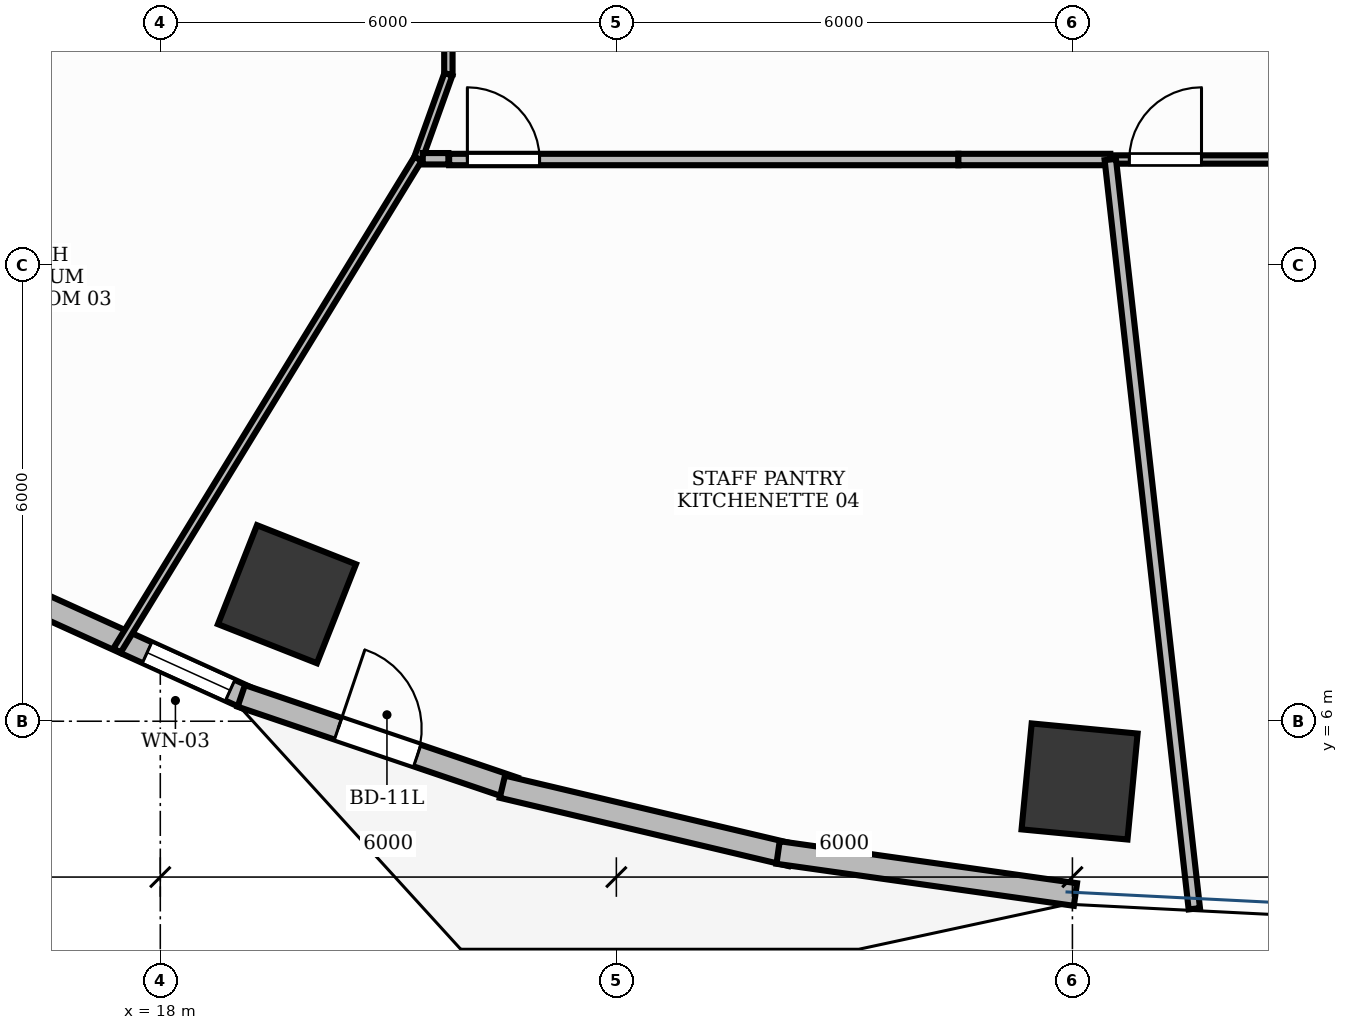
"""IFC4 building model, lengths in metres.
Left out: names, types, materials, properties, quantities, classifications, styles, units other than length and angle.
Written with IfcOpenShell. Run it as: python <this file> out.ifc"""

import sys

from ifc_helpers import new_model, si_unit, direction, frame, frame_2d, origin, origin_2d, place, context, subcontext, project, spatial, rectangle, extrude, element, fill, save


model = new_model("IFC4")
c1 = context("Model", 3, precision=1e-05, world=origin(), true_north=direction((0.0, 1.0)))
c2 = subcontext(c1, "Body", "Model", "MODEL_VIEW")
j1 = project(units=[si_unit("LENGTHUNIT", "METRE"), si_unit("PLANEANGLEUNIT", "RADIAN")], contexts=[c1])
p1 = place(None, origin())
s1 = spatial("IfcSite", under=j1, at=p1, CompositionType="ELEMENT")
p2 = place(p1, origin())
s2 = spatial("IfcBuilding", under=s1, at=p2, CompositionType="ELEMENT")
p3 = place(p2, frame((0.0, 0.0, 76.2)))
s3 = spatial("IfcBuildingStorey", under=s2, at=p3, CompositionType="ELEMENT", Elevation=76.2)
for number, where, z_axis, x_axis in (
    (1, (19.667, 7.671, -0.0), (0.0, 0.0, 1.0), (-0.93, 0.367, 0.0)),
    (2, (30.094, 5.208, -0.0), (0.0, 0.0, 1.0), (-0.995, 0.095, 0.0)),
):
    element("IfcColumn", number, at=place(p3, frame(where, z_axis=z_axis, x_axis=x_axis)), inside=s3, PredefinedType="COLUMN", context=c2, shape_type="SweptSolid", body=[
        extrude(rectangle(XDim=1.4, YDim=1.4, at=origin_2d()), origin(), (0.0, 0.0, 1.0), 3.901),
    ])
p4 = place(p3, frame((15.822, 7.812, 0.0), z_axis=(0.0, 0.0, 1.0), x_axis=(0.910608120407, -0.413270917254, 0.0)))
e3 = element("IfcWall", 3, at=p4, inside=s3, PredefinedType="STANDARD", context=c2, shape_type="SweptSolid", body=[
    extrude(rectangle(XDim=3.7, YDim=0.3, at=frame_2d((1.85, 0.0))), origin(), (0.0, 0.0, 1.0), 3.9),
])
p5 = place(p4, frame((2.201, 0.0, 0.9)))
e4 = element("IfcOpeningElement", 4, at=p5, cuts=e3, PredefinedType="OPENING", context=c2, shape_type="SweptSolid", body=[
    extrude(rectangle(XDim=1.2, YDim=2.7, at=frame_2d((0.6, 1.35))), frame((0.0, 0.165, 0.0), z_axis=(0.0, -1.0, 0.0), x_axis=(1.0, 0.0, 0.0)), (0.0, 0.0, 1.0), 0.33),
])
p6 = place(p3, frame((19.065, 6.333, 0.0), z_axis=(0.0, 0.0, 1.0), x_axis=(0.947034337234, -0.321132315564, 0.0)))
e5 = element("IfcWall", 5, at=p6, inside=s3, PredefinedType="STANDARD", context=c2, shape_type="SweptSolid", body=[
    extrude(rectangle(XDim=3.79, YDim=0.3, at=frame_2d((1.895, 0.0))), origin(), (0.0, 0.0, 1.0), 3.9),
])
p7 = place(p6, frame((1.345, 0.0, 0.0)))
e6 = element("IfcOpeningElement", 6, at=p7, cuts=e5, PredefinedType="OPENING", context=c2, shape_type="SweptSolid", body=[
    extrude(rectangle(XDim=1.1, YDim=2.15, at=frame_2d((0.55, 1.075))), frame((0.0, 0.165, 0.0), z_axis=(0.0, -1.0, 0.0), x_axis=(1.0, 0.0, 0.0)), (0.0, 0.0, 1.0), 0.33),
])
p8 = place(p3, frame((22.5, 5.138, 0.0), z_axis=(0.0, 0.0, 1.0), x_axis=(0.973197600754, -0.229970497863, 0.0)))
e7 = element("IfcWall", 7, at=p8, inside=s3, PredefinedType="STANDARD", context=c2, shape_type="SweptSolid", body=[
    extrude(rectangle(XDim=3.901, YDim=0.3, at=frame_2d((1.951, 0.0))), origin(), (0.0, 0.0, 1.0), 3.9),
])
p9 = place(p3, frame((26.128, 4.273, 0.0), z_axis=(0.0, 0.0, 1.0), x_axis=(0.990165832998, -0.139898617443, 0.0)))
e8 = element("IfcWall", 8, at=p9, inside=s3, PredefinedType="STANDARD", context=c2, shape_type="SweptSolid", body=[
    extrude(rectangle(XDim=3.951, YDim=0.3, at=frame_2d((1.976, 0.0))), origin(), (0.0, 0.0, 1.0), 3.9),
])
p10 = place(p3, frame((21.8, 13.39, 0.0), z_axis=(0.0, 0.0, 1.0), x_axis=(1.0, 0.0, 0.0)))
e9 = element("IfcWall", 9, at=p10, inside=s3, PredefinedType="PARTITIONING", context=c2, shape_type="SweptSolid", body=[
    extrude(rectangle(XDim=6.7, YDim=0.15, at=frame_2d((3.35, 0.0))), origin(), (0.0, 0.0, 1.0), 2.91),
])
p11 = place(p10, frame((0.24, 0.0, 0.0)))
e10 = element("IfcOpeningElement", 10, at=p11, cuts=e9, PredefinedType="OPENING", context=c2, shape_type="SweptSolid", body=[
    extrude(rectangle(XDim=0.95, YDim=2.15, at=frame_2d((0.475, 1.075))), frame((0.0, 0.09, 0.0), z_axis=(0.0, -1.0, 0.0), x_axis=(1.0, 0.0, 0.0)), (0.0, 0.0, 1.0), 0.18),
])
p12 = place(p3, frame((30.508, 13.39, 0.0), z_axis=(0.0, 0.0, 1.0), x_axis=(1.0, 0.0, 0.0)))
e11 = element("IfcWall", 11, at=p12, inside=s3, PredefinedType="MOVABLE", context=c2, shape_type="SweptSolid", body=[
    extrude(rectangle(XDim=5.092, YDim=0.11, at=frame_2d((2.546, 0.0))), origin(), (0.0, 0.0, 1.0), 2.91),
])
p13 = place(p12, frame((0.24, 0.0, 0.0)))
e12 = element("IfcOpeningElement", 12, at=p13, cuts=e11, PredefinedType="OPENING", context=c2, shape_type="SweptSolid", body=[
    extrude(rectangle(XDim=0.95, YDim=2.15, at=frame_2d((0.475, 1.075))), frame((0.0, 0.07, 0.0), z_axis=(0.0, -1.0, 0.0), x_axis=(1.0, 0.0, 0.0)), (0.0, 0.0, 1.0), 0.14),
])
p14 = place(p3, frame((21.79, 18.44, 0.0), z_axis=(0.0, 0.0, 1.0), x_axis=(0.0, -1.0, 0.0)))
e13 = element("IfcWall", 13, at=p14, inside=s3, PredefinedType="MOVABLE", context=c2, shape_type="SweptSolid", body=[
    extrude(rectangle(XDim=3.929, YDim=0.11, at=frame_2d((1.964, 0.0))), origin(), (0.0, 0.0, 1.0), 2.91),
])
p15 = place(p3, frame((21.79, 14.511, 0.0), z_axis=(0.0, 0.0, 1.0), x_axis=(-0.337672177142, -0.941263778536, 0.0)))
e14 = element("IfcWall", 14, at=p15, inside=s3, PredefinedType="MOVABLE", context=c2, shape_type="SweptSolid", body=[
    extrude(rectangle(XDim=1.181, YDim=0.11, at=frame_2d((0.59, 0.0))), origin(), (0.0, 0.0, 1.0), 2.91),
])
p16 = place(p3, frame((21.391, 13.4, 0.0), z_axis=(0.0, 0.0, 1.0), x_axis=(-0.522118984401, -0.852872655282, 0.0)))
e15 = element("IfcWall", 15, at=p16, inside=s3, PredefinedType="MOVABLE", context=c2, shape_type="SweptSolid", body=[
    extrude(rectangle(XDim=7.586, YDim=0.11, at=frame_2d((3.793, 0.0))), origin(), (0.0, 0.0, 1.0), 2.91),
])
p17 = place(p3, frame((28.5, 13.39, 0.0), z_axis=(0.0, 0.0, 1.0), x_axis=(1.0, 0.0, 0.0)))
e16 = element("IfcWall", 16, at=p17, inside=s3, PredefinedType="PARTITIONING", context=c2, shape_type="SweptSolid", body=[
    extrude(rectangle(XDim=1.998, YDim=0.15, at=frame_2d((0.999, 0.0))), origin(), (0.0, 0.0, 1.0), 2.91),
])
p18 = place(p3, frame((30.498, 13.39, 0.0), z_axis=(0.0, 0.0, 1.0), x_axis=(0.11147423436, -0.993767324414, 0.0)))
e17 = element("IfcWall", 17, at=p18, inside=s3, PredefinedType="PARTITIONING", context=c2, shape_type="SweptSolid", body=[
    extrude(rectangle(XDim=9.919, YDim=0.15, at=frame_2d((4.959, 0.0))), origin(), (0.0, 0.0, 1.0), 2.91),
])
p19 = place(p3, frame((21.453, 13.4, 0.0), z_axis=(0.0, 0.0, 1.0), x_axis=(1.0, 0.0, 0.0)))
e18 = element("IfcWall", 18, at=p19, inside=s3, PredefinedType="PARTITIONING", context=c2, shape_type="SweptSolid", body=[
    extrude(rectangle(XDim=0.337, YDim=0.15, at=frame_2d((0.168, 0.0))), origin(), (0.0, 0.0, 1.0), 2.91),
])
p20 = place(p5, origin())
e19 = element("IfcWindow", 19, at=p20, inside=s3, PartitioningType="SINGLE_PANEL", PredefinedType="WINDOW", context=c2, shape_type="SweptSolid", body=[
    extrude(rectangle(XDim=1.2, YDim=2.7, at=frame_2d((0.6, 1.35))), frame((0.0, 0.03, 0.0), z_axis=(0.0, -1.0, 0.0), x_axis=(1.0, 0.0, 0.0)), (0.0, 0.0, 1.0), 0.06),
])
fill(e4, e19)
p21 = place(p7, origin())
e20 = element("IfcDoor", 20, at=p21, inside=s3, OperationType="SINGLE_SWING_LEFT", PredefinedType="DOOR", context=c2, shape_type="SweptSolid", body=[
    extrude(rectangle(XDim=1.1, YDim=2.15, at=frame_2d((0.55, 1.075))), frame((0.0, 0.025, 0.0), z_axis=(0.0, -1.0, 0.0), x_axis=(1.0, 0.0, 0.0)), (0.0, 0.0, 1.0), 0.05),
])
fill(e6, e20)
p22 = place(p11, origin())
e21 = element("IfcDoor", 21, at=p22, inside=s3, OperationType="SINGLE_SWING_LEFT", PredefinedType="DOOR", context=c2, shape_type="SweptSolid", body=[
    extrude(rectangle(XDim=0.95, YDim=2.15, at=frame_2d((0.475, 1.075))), frame((0.0, 0.025, 0.0), z_axis=(0.0, -1.0, 0.0), x_axis=(1.0, 0.0, 0.0)), (0.0, 0.0, 1.0), 0.05),
])
fill(e10, e21)
p23 = place(p13, origin())
e22 = element("IfcDoor", 22, at=p23, inside=s3, OperationType="SINGLE_SWING_RIGHT", PredefinedType="DOOR", context=c2, shape_type="SweptSolid", body=[
    extrude(rectangle(XDim=0.95, YDim=2.15, at=frame_2d((0.475, 1.075))), frame((0.0, 0.025, 0.0), z_axis=(0.0, -1.0, 0.0), x_axis=(1.0, 0.0, 0.0)), (0.0, 0.0, 1.0), 0.05),
])
fill(e12, e22)
save(model, sys.argv[1])
